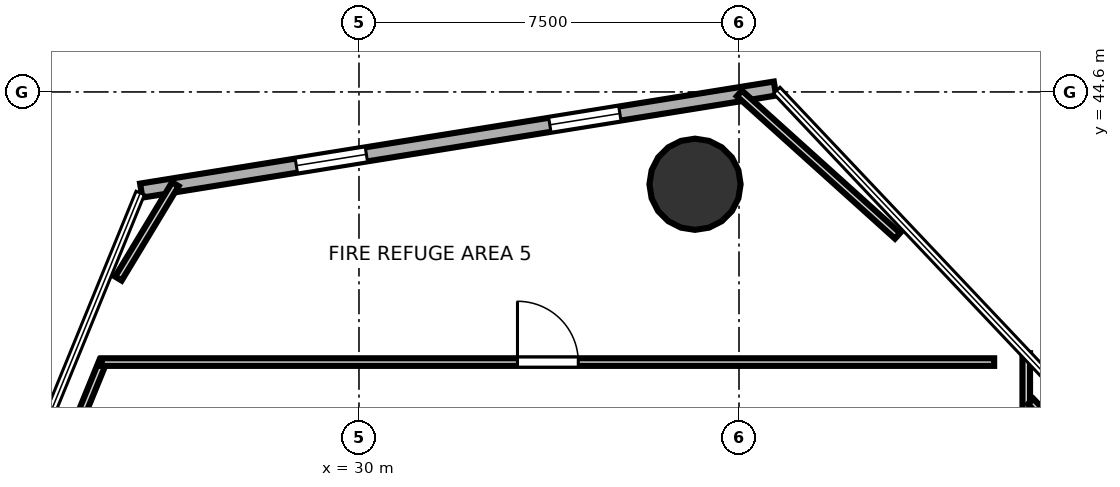
"""IFC4 building model, lengths in metres.
Left out: names, types, materials, properties, quantities, classifications, styles, units other than length and angle.
Written with IfcOpenShell. Run it as: python <this file> out.ifc"""

import sys

from ifc_helpers import new_model, si_unit, direction, frame, frame_2d, origin, origin_2d, place, context, subcontext, project, spatial, rectangle, hollow_circle, extrude, element, fill, save


model = new_model("IFC4")
c1 = context("Model", 3, precision=1e-05, world=origin(), true_north=direction((0.0, 1.0)))
c2 = subcontext(c1, "Body", "Model", "MODEL_VIEW")
j1 = project(units=[si_unit("LENGTHUNIT", "METRE"), si_unit("PLANEANGLEUNIT", "RADIAN")], contexts=[c1])
p1 = place(None, origin())
s1 = spatial("IfcSite", under=j1, at=p1, CompositionType="ELEMENT")
p2 = place(p1, origin())
s2 = spatial("IfcBuilding", under=s1, at=p2, CompositionType="ELEMENT")
p3 = place(p2, frame((0.0, 0.0, 47.9)))
s3 = spatial("IfcBuildingStorey", under=s2, at=p3, CompositionType="ELEMENT", Elevation=47.9)
p4 = place(p3, frame((36.632, 42.778, 0.0), z_axis=(0.0, 0.0, 1.0), x_axis=(1.0, 0.0, 0.0)))
e1 = element("IfcColumn", 1, at=p4, inside=s3, PredefinedType="COLUMN", context=c2, shape_type="SweptSolid", body=[
    extrude(hollow_circle(Radius=0.9, WallThickness=0.045, at=origin_2d()), origin(), (0.0, 0.0, 1.0), 4.6),
])
p5 = place(p3, frame((38.21, 44.667, 0.0), z_axis=(0.0, 0.0, 1.0), x_axis=(-0.987285743685, -0.158955529366, 0.0)))
e2 = element("IfcWall", 2, at=p5, inside=s3, PredefinedType="SOLIDWALL", context=c2, shape_type="SweptSolid", body=[
    extrude(rectangle(XDim=12.668, YDim=0.28, at=frame_2d((6.334, 0.0))), origin(), (0.0, 0.0, 1.0), 4.42),
])
p6 = place(p5, frame((3.101, 0.0, 1.0)))
e3 = element("IfcOpeningElement", 3, at=p6, cuts=e2, PredefinedType="OPENING", context=c2, shape_type="SweptSolid", body=[
    extrude(rectangle(XDim=1.4, YDim=1.5, at=frame_2d((0.7, 0.75))), frame((0.0, 0.15, 0.0), z_axis=(0.0, -1.0, 0.0), x_axis=(1.0, 0.0, 0.0)), (0.0, 0.0, 1.0), 0.3),
])
p7 = place(p5, frame((8.168, 0.0, 1.0)))
e4 = element("IfcOpeningElement", 4, at=p7, cuts=e2, PredefinedType="OPENING", context=c2, shape_type="SweptSolid", body=[
    extrude(rectangle(XDim=1.4, YDim=1.5, at=frame_2d((0.7, 0.75))), frame((0.0, 0.15, 0.0), z_axis=(0.0, -1.0, 0.0), x_axis=(1.0, 0.0, 0.0)), (0.0, 0.0, 1.0), 0.3),
])
p8 = place(p3, frame((23.052, 34.648, 0.0), z_axis=(0.0, 0.0, 1.0), x_axis=(0.378517163143, 0.925594272457, 0.0)))
e5 = element("IfcWall", 5, at=p8, inside=s3, PredefinedType="PARTITIONING", context=c2, shape_type="SweptSolid", body=[
    extrude(rectangle(XDim=5.013, YDim=0.15, at=frame_2d((2.506, 0.0))), origin(), (0.0, 0.0, 1.0), 2.94),
])
p9 = place(p3, frame((24.92, 39.269, 0.0), z_axis=(0.0, 0.0, 1.0), x_axis=(1.0, 0.0, 0.0)))
e6 = element("IfcWall", 6, at=p9, inside=s3, PredefinedType="PARTITIONING", context=c2, shape_type="SweptSolid", body=[
    extrude(rectangle(XDim=17.615, YDim=0.15, at=frame_2d((8.808, 0.0))), origin(), (0.0, 0.0, 1.0), 2.94),
])
p10 = place(p9, frame((8.208, 0.0, 0.0)))
e7 = element("IfcOpeningElement", 7, at=p10, cuts=e6, PredefinedType="OPENING", context=c2, shape_type="SweptSolid", body=[
    extrude(rectangle(XDim=1.2, YDim=2.15, at=frame_2d((0.6, 1.075))), frame((0.0, 0.085, 0.0), z_axis=(0.0, -1.0, 0.0), x_axis=(1.0, 0.0, 0.0)), (0.0, 0.0, 1.0), 0.17),
])
p11 = place(p3, frame((43.169, 39.444, 0.0), z_axis=(0.0, 0.0, 1.0), x_axis=(0.0, -1.0, 0.0)))
e8 = element("IfcWall", 8, at=p11, inside=s3, PredefinedType="PARTITIONING", context=c2, shape_type="SweptSolid", body=[
    extrude(rectangle(XDim=2.732, YDim=0.15, at=frame_2d((1.366, 0.0))), origin(), (0.0, 0.0, 1.0), 2.94),
])
p12 = place(p11, frame((1.326, 0.0, 0.0)))
e9 = element("IfcOpeningElement", 9, at=p12, cuts=e8, PredefinedType="OPENING", context=c2, shape_type="SweptSolid", body=[
    extrude(rectangle(XDim=1.2, YDim=2.15, at=frame_2d((0.6, 1.075))), frame((0.0, 0.085, 0.0), z_axis=(0.0, -1.0, 0.0), x_axis=(1.0, 0.0, 0.0)), (0.0, 0.0, 1.0), 0.17),
])
p13 = place(p3, frame((43.258, 38.492, 0.0), z_axis=(0.0, 0.0, 1.0), x_axis=(0.687175745044, -0.726491221849, 0.0)))
e10 = element("IfcWall", 10, at=p13, inside=s3, PredefinedType="PARTITIONING", context=c2, shape_type="SweptSolid", body=[
    extrude(rectangle(XDim=6.645, YDim=0.15, at=frame_2d((3.322, 0.0))), origin(), (0.0, 0.0, 1.0), 2.94),
])
p14 = place(p3, frame((25.252, 40.917, 0.0), z_axis=(0.0, 0.0, 1.0), x_axis=(0.516903237171, 0.856043832641, 0.0)))
e11 = element("IfcWall", 11, at=p14, inside=s3, PredefinedType="PARTITIONING", context=c2, shape_type="SweptSolid", body=[
    extrude(rectangle(XDim=2.176, YDim=0.15, at=frame_2d((1.088, 0.0))), origin(), (0.0, 0.0, 1.0), 2.94),
])
p15 = place(p3, frame((37.508, 44.57, 0.0), z_axis=(0.0, 0.0, 1.0), x_axis=(0.743120643554, -0.66915746213, 0.0)))
e12 = element("IfcWall", 12, at=p15, inside=s3, PredefinedType="PARTITIONING", context=c2, shape_type="SweptSolid", body=[
    extrude(rectangle(XDim=4.199, YDim=0.15, at=frame_2d((2.099, 0.0))), origin(), (0.0, 0.0, 1.0), 2.94),
])
p16 = place(p10, origin())
e13 = element("IfcDoor", 13, at=p16, inside=s3, OperationType="SINGLE_SWING_LEFT", PredefinedType="DOOR", context=c2, shape_type="SweptSolid", body=[
    extrude(rectangle(XDim=1.2, YDim=2.15, at=frame_2d((0.6, 1.075))), frame((0.0, 0.025, 0.0), z_axis=(0.0, -1.0, 0.0), x_axis=(1.0, 0.0, 0.0)), (0.0, 0.0, 1.0), 0.05),
])
fill(e7, e13)
p17 = place(p6, origin())
e14 = element("IfcWindow", 14, at=p17, inside=s3, PartitioningType="SINGLE_PANEL", PredefinedType="WINDOW", context=c2, shape_type="SweptSolid", body=[
    extrude(rectangle(XDim=1.4, YDim=1.5, at=frame_2d((0.7, 0.75))), frame((0.0, 0.03, 0.0), z_axis=(0.0, -1.0, 0.0), x_axis=(1.0, 0.0, 0.0)), (0.0, 0.0, 1.0), 0.06),
])
fill(e3, e14)
p18 = place(p7, origin())
e15 = element("IfcWindow", 15, at=p18, inside=s3, PartitioningType="SINGLE_PANEL", PredefinedType="WINDOW", context=c2, shape_type="SweptSolid", body=[
    extrude(rectangle(XDim=1.4, YDim=1.5, at=frame_2d((0.7, 0.75))), frame((0.0, 0.03, 0.0), z_axis=(0.0, -1.0, 0.0), x_axis=(1.0, 0.0, 0.0)), (0.0, 0.0, 1.0), 0.06),
])
fill(e4, e15)
save(model, sys.argv[1])
